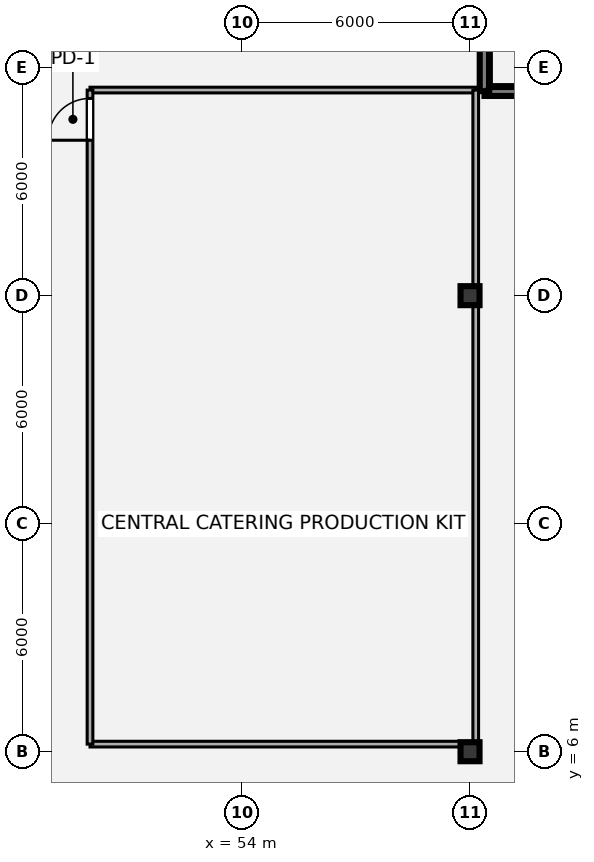
"""IFC4 building model, lengths in metres.
Left out: names, types, materials, properties, quantities, classifications, styles, units other than length and angle.
Written with IfcOpenShell. Run it as: python <this file> out.ifc"""

import sys

from ifc_helpers import new_model, si_unit, direction, frame, frame_2d, origin, origin_2d, place, context, subcontext, project, spatial, rectangle, i_section, extrude, source, transform, mapped, element, fill, save


model = new_model("IFC4")
c1 = context("Model", 3, precision=1e-05, world=origin(), true_north=direction((0.0, 1.0)))
c2 = subcontext(c1, "Body", "Model", "MODEL_VIEW")
j1 = project(units=[si_unit("LENGTHUNIT", "METRE"), si_unit("PLANEANGLEUNIT", "RADIAN")], contexts=[c1])
p1 = place(None, origin())
s1 = spatial("IfcSite", under=j1, at=p1, CompositionType="ELEMENT")
p2 = place(p1, origin())
s2 = spatial("IfcBuilding", under=s1, at=p2, CompositionType="ELEMENT")
p3 = place(p2, frame((0.0, 0.0, 14.04)))
s3 = spatial("IfcBuildingStorey", under=s2, at=p3, CompositionType="ELEMENT", Elevation=14.04)
m1 = source(origin(), c2, "Body", "SweptSolid", [
    extrude(i_section(OverallWidth=0.5, OverallDepth=0.5, WebThickness=0.022, FlangeThickness=0.035, at=origin_2d()), origin(), (0.0, 0.0, 1.0), 4.32),
])
for number, where, z_axis, x_axis in (
    (1, (60.0, 6.0, 0.0), (0.0, 0.0, 1.0), (1.0, 0.0, 0.0)),
    (2, (60.0, 18.0, 0.0), (0.0, 0.0, 1.0), (1.0, 0.0, 0.0)),
):
    element("IfcColumn", number, at=place(p3, frame(where, z_axis=z_axis, x_axis=x_axis)), inside=s3, PredefinedType="COLUMN", context=c2, shape_type="MappedRepresentation", body=[
        mapped(m1, transform((0.0, 0.0, 0.0), x_axis=(1.0, 0.0, 0.0), y_axis=(0.0, 1.0, 0.0), z_axis=(0.0, 0.0, 1.0), scale=1.0)),
    ])
p4 = place(p3, frame((60.38, 23.38, 0.0), z_axis=(0.0, 0.0, 1.0), x_axis=(1.0, 0.0, 0.0)))
e3 = element("IfcWall", 3, at=p4, inside=s3, PredefinedType="SHEAR", context=c2, shape_type="SweptSolid", body=[
    extrude(rectangle(XDim=3.74, YDim=0.25, at=frame_2d((1.87, 0.0))), origin(), (0.0, 0.0, 1.0), 4.32),
])
p5 = place(p3, frame((60.38, 23.38, 0.0), z_axis=(0.0, 0.0, 1.0), x_axis=(0.0, 1.0, 0.0)))
e4 = element("IfcWall", 4, at=p5, inside=s3, PredefinedType="SHEAR", context=c2, shape_type="SweptSolid", body=[
    extrude(rectangle(XDim=7.47, YDim=0.25, at=frame_2d((3.735, 0.0))), origin(), (0.0, 0.0, 1.0), 4.32),
])
p6 = place(p3, frame((50.0, 6.2, 0.0), z_axis=(0.0, 0.0, 1.0), x_axis=(1.0, 0.0, 0.0)))
e5 = element("IfcWall", 5, at=p6, inside=s3, PredefinedType="PARTITIONING", context=c2, shape_type="SweptSolid", body=[
    extrude(rectangle(XDim=10.15, YDim=0.15, at=frame_2d((5.075, 0.0))), origin(), (0.0, 0.0, 1.0), 3.325),
])
p7 = place(p3, frame((50.0, 23.41, 0.0), z_axis=(0.0, 0.0, 1.0), x_axis=(1.0, 0.0, 0.0)))
e6 = element("IfcWall", 6, at=p7, inside=s3, PredefinedType="PARTITIONING", context=c2, shape_type="SweptSolid", body=[
    extrude(rectangle(XDim=10.15, YDim=0.15, at=frame_2d((5.075, 0.0))), origin(), (0.0, 0.0, 1.0), 4.01),
])
p8 = place(p3, frame((50.0, 6.2, 0.0), z_axis=(0.0, 0.0, 1.0), x_axis=(0.0, 1.0, 0.0)))
e7 = element("IfcWall", 7, at=p8, inside=s3, PredefinedType="PARTITIONING", context=c2, shape_type="SweptSolid", body=[
    extrude(rectangle(XDim=17.21, YDim=0.15, at=frame_2d((8.605, 0.0))), origin(), (0.0, 0.0, 1.0), 3.718),
])
p9 = place(p8, frame((15.89, 0.0, 0.0)))
e8 = element("IfcOpeningElement", 8, at=p9, cuts=e7, PredefinedType="OPENING", context=c2, shape_type="SweptSolid", body=[
    extrude(rectangle(XDim=1.1, YDim=2.1, at=origin_2d()), frame((0.55, 0.085, 1.05), z_axis=(0.0, -1.0, 0.0), x_axis=(1.0, 0.0, 0.0)), (0.0, 0.0, 1.0), 0.17),
])
p10 = place(p3, frame((60.15, 6.2, 0.0), z_axis=(0.0, 0.0, 1.0), x_axis=(0.0, 1.0, 0.0)))
e9 = element("IfcWall", 9, at=p10, inside=s3, PredefinedType="PARTITIONING", context=c2, shape_type="SweptSolid", body=[
    extrude(rectangle(XDim=17.21, YDim=0.15, at=frame_2d((8.605, 0.0))), origin(), (0.0, 0.0, 1.0), 3.225),
])
m2 = source(origin(), c2, "Body", "SweptSolid", [
    extrude(rectangle(XDim=1.1, YDim=2.1, at=origin_2d()), frame((0.55, 0.025, 1.05), z_axis=(0.0, -1.0, 0.0), x_axis=(1.0, 0.0, 0.0)), (0.0, 0.0, 1.0), 0.05),
])
p11 = place(p9, origin())
e10 = element("IfcDoor", 10, at=p11, inside=s3, OperationType="SINGLE_SWING_LEFT", PredefinedType="DOOR", context=c2, shape_type="MappedRepresentation", body=[
    mapped(m2, transform((0.0, 0.0, 0.0), x_axis=(1.0, 0.0, 0.0), y_axis=(0.0, 1.0, 0.0), z_axis=(0.0, 0.0, 1.0), scale=1.0)),
])
fill(e8, e10)
save(model, sys.argv[1])
